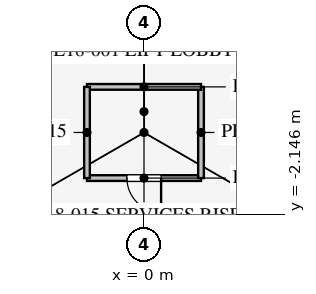
"""IFC4 building model, lengths in metres.
Left out: names, types, materials, properties, quantities, classifications, styles, units other than length and angle.
Written with IfcOpenShell. Run it as: python <this file> out.ifc"""

import sys

from ifc_helpers import new_model, si_unit, direction, frame, frame_2d, origin, place, context, subcontext, project, spatial, rectangle, extrude, element, fill, save


model = new_model("IFC4")
c1 = context("Model", 3, precision=1e-05, world=origin(), true_north=direction((0.0, 1.0)))
c2 = subcontext(c1, "Body", "Model", "MODEL_VIEW")
j1 = project(units=[si_unit("LENGTHUNIT", "METRE"), si_unit("PLANEANGLEUNIT", "RADIAN")], contexts=[c1])
p1 = place(None, origin())
s1 = spatial("IfcSite", under=j1, at=p1, CompositionType="ELEMENT")
p2 = place(p1, origin())
s2 = spatial("IfcBuilding", under=s1, at=p2, CompositionType="ELEMENT")
p3 = place(p2, frame((0.0, 0.0, 79.5)))
s3 = spatial("IfcBuildingStorey", under=s2, at=p3, CompositionType="ELEMENT", Elevation=79.5)
p4 = place(p3, frame((-1.5, -1.2, 0.0), z_axis=(0.0, 0.0, 1.0), x_axis=(1.0, 0.0, 0.0)))
e1 = element("IfcWall", 1, at=p4, inside=s3, PredefinedType="PARTITIONING", context=c2, shape_type="SweptSolid", body=[
    extrude(rectangle(XDim=3.0, YDim=0.15, at=frame_2d((1.5, 0.0))), origin(), (0.0, 0.0, 1.0), 4.0),
])
p5 = place(p4, frame((1.05, 0.0, 0.0)))
e2 = element("IfcOpeningElement", 2, at=p5, cuts=e1, PredefinedType="OPENING", context=c2, shape_type="SweptSolid", body=[
    extrude(rectangle(XDim=0.9, YDim=2.1, at=frame_2d((0.45, 1.05))), frame((0.0, 0.085, 0.0), z_axis=(0.0, -1.0, 0.0), x_axis=(1.0, 0.0, 0.0)), (0.0, 0.0, 1.0), 0.17),
])
p6 = place(p3, frame((1.5, -1.2, 0.0), z_axis=(0.0, 0.0, 1.0), x_axis=(0.0, 1.0, 0.0)))
e3 = element("IfcWall", 3, at=p6, inside=s3, PredefinedType="PARTITIONING", context=c2, shape_type="SweptSolid", body=[
    extrude(rectangle(XDim=2.4, YDim=0.15, at=frame_2d((1.2, 0.0))), origin(), (0.0, 0.0, 1.0), 4.0),
])
p7 = place(p3, frame((1.5, 1.2, 0.0), z_axis=(0.0, 0.0, 1.0), x_axis=(-1.0, 0.0, 0.0)))
e4 = element("IfcWall", 4, at=p7, inside=s3, PredefinedType="PARTITIONING", context=c2, shape_type="SweptSolid", body=[
    extrude(rectangle(XDim=3.0, YDim=0.15, at=frame_2d((1.5, 0.0))), origin(), (0.0, 0.0, 1.0), 4.0),
])
p8 = place(p3, frame((-1.5, 1.2, 0.0), z_axis=(0.0, 0.0, 1.0), x_axis=(0.0, -1.0, 0.0)))
e5 = element("IfcWall", 5, at=p8, inside=s3, PredefinedType="PARTITIONING", context=c2, shape_type="SweptSolid", body=[
    extrude(rectangle(XDim=2.4, YDim=0.15, at=frame_2d((1.2, 0.0))), origin(), (0.0, 0.0, 1.0), 4.0),
])
p9 = place(p5, frame((0.9, 0.0, 0.0), z_axis=(0.0, 0.0, 1.0), x_axis=(-1.0, 0.0, 0.0)))
e6 = element("IfcDoor", 6, at=p9, inside=s3, OperationType="SINGLE_SWING_LEFT", PredefinedType="DOOR", context=c2, shape_type="SweptSolid", body=[
    extrude(rectangle(XDim=0.9, YDim=2.1, at=frame_2d((0.45, 1.05))), frame((0.0, 0.025, 0.0), z_axis=(0.0, -1.0, 0.0), x_axis=(1.0, 0.0, 0.0)), (0.0, 0.0, 1.0), 0.05),
])
fill(e2, e6)
save(model, sys.argv[1])
